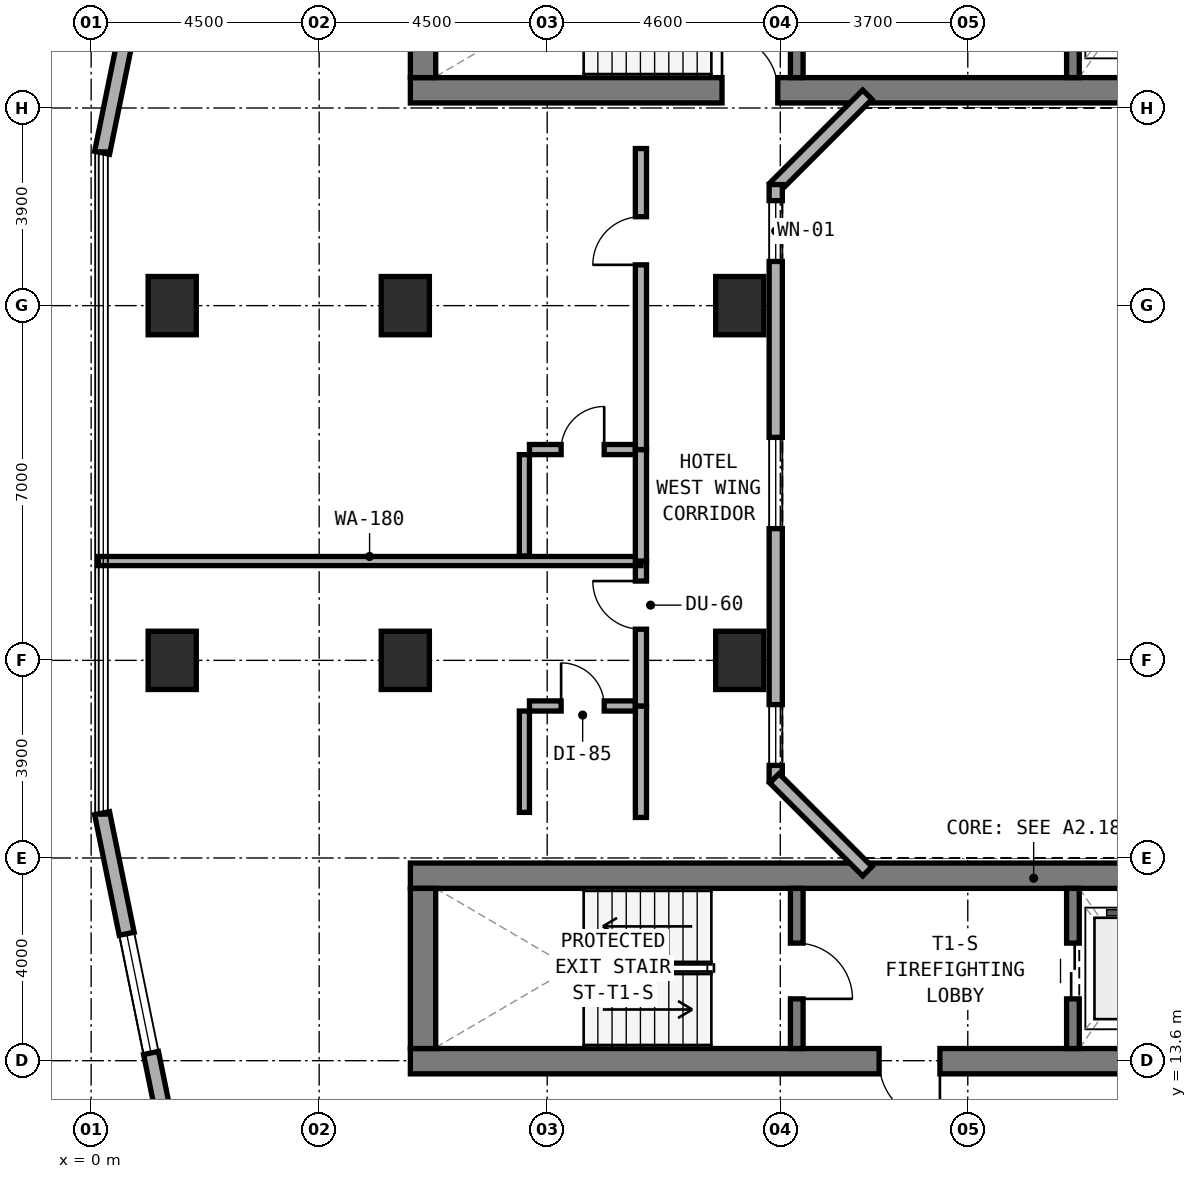
"""IFC4 building model, lengths in metres.
Left out: names, types, materials, properties, quantities, classifications, styles, units other than length and angle.
Written with IfcOpenShell. Run it as: python <this file> out.ifc"""

import sys

from ifc_helpers import new_model, si_unit, direction, frame, frame_2d, origin, origin_2d, place, context, subcontext, project, spatial, rectangle, extrude, element, fill, save


model = new_model("IFC4")
c1 = context("Model", 3, precision=1e-05, world=origin(), true_north=direction((0.0, 1.0)))
c2 = subcontext(c1, "Body", "Model", "MODEL_VIEW")
j1 = project(units=[si_unit("LENGTHUNIT", "METRE"), si_unit("PLANEANGLEUNIT", "RADIAN")], contexts=[c1])
p1 = place(None, origin())
s1 = spatial("IfcSite", under=j1, at=p1, CompositionType="ELEMENT")
p2 = place(p1, origin())
s2 = spatial("IfcBuilding", under=s1, at=p2, CompositionType="ELEMENT")
p3 = place(p2, frame((0.0, 0.0, 73.0)))
s3 = spatial("IfcBuildingStorey", under=s2, at=p3, CompositionType="ELEMENT", Elevation=73.0)
p4 = place(p3, frame((6.3, 32.75, 0.0), z_axis=(0.0, 0.0, 1.0), x_axis=(1.0, 0.0, 0.0)))
e1 = element("IfcWall", 1, at=p4, inside=s3, PredefinedType="SHEAR", context=c2, shape_type="SweptSolid", body=[
    extrude(rectangle(XDim=24.6, YDim=0.5, at=frame_2d((12.3, 0.0))), origin(), (0.0, 0.0, 1.0), 3.5),
])
p5 = place(p4, frame((6.15, 0.0, 0.0)))
e2 = element("IfcOpeningElement", 2, at=p5, cuts=e1, PredefinedType="OPENING", context=c2, shape_type="SweptSolid", body=[
    extrude(rectangle(XDim=1.1, YDim=2.15, at=frame_2d((0.55, 1.075))), frame((0.0, 0.26, 0.0), z_axis=(0.0, -1.0, 0.0), x_axis=(1.0, 0.0, 0.0)), (0.0, 0.0, 1.0), 0.52),
])
p6 = place(p3, frame((6.55, 33.0, 0.0), z_axis=(0.0, 0.0, 1.0), x_axis=(0.0, 1.0, 0.0)))
e3 = element("IfcWall", 3, at=p6, inside=s3, PredefinedType="SHEAR", context=c2, shape_type="SweptSolid", body=[
    extrude(rectangle(XDim=3.16, YDim=0.5, at=frame_2d((1.58, 0.0))), origin(), (0.0, 0.0, 1.0), 3.5),
])
p7 = place(p3, frame((13.925, 33.0, 0.0), z_axis=(0.0, 0.0, 1.0), x_axis=(0.0, 1.0, 0.0)))
e4 = element("IfcWall", 4, at=p7, inside=s3, PredefinedType="STANDARD", context=c2, shape_type="SweptSolid", body=[
    extrude(rectangle(XDim=3.16, YDim=0.25, at=frame_2d((1.58, 0.0))), origin(), (0.0, 0.0, 1.0), 3.22),
])
p8 = place(p7, frame((0.98, 0.0, 0.0)))
e5 = element("IfcOpeningElement", 5, at=p8, cuts=e4, PredefinedType="OPENING", context=c2, shape_type="SweptSolid", body=[
    extrude(rectangle(XDim=1.1, YDim=2.15, at=frame_2d((0.55, 1.075))), frame((0.0, 0.135, 0.0), z_axis=(0.0, -1.0, 0.0), x_axis=(1.0, 0.0, 0.0)), (0.0, 0.0, 1.0), 0.27),
])
p9 = place(p3, frame((19.375, 33.0, 0.0), z_axis=(0.0, 0.0, 1.0), x_axis=(0.0, 1.0, 0.0)))
e6 = element("IfcWall", 6, at=p9, inside=s3, PredefinedType="STANDARD", context=c2, shape_type="SweptSolid", body=[
    extrude(rectangle(XDim=3.16, YDim=0.25, at=frame_2d((1.58, 0.0))), origin(), (0.0, 0.0, 1.0), 3.22),
])
p10 = place(p9, frame((0.98, 0.0, 0.0)))
e7 = element("IfcOpeningElement", 7, at=p10, cuts=e6, PredefinedType="OPENING", context=c2, shape_type="SweptSolid", body=[
    extrude(rectangle(XDim=1.1, YDim=2.15, at=frame_2d((0.55, 1.075))), frame((0.0, 0.135, 0.0), z_axis=(0.0, -1.0, 0.0), x_axis=(1.0, 0.0, 0.0)), (0.0, 0.0, 1.0), 0.27),
])
p11 = place(p3, frame((6.3, 13.59, 0.0), z_axis=(0.0, 0.0, 1.0), x_axis=(1.0, 0.0, 0.0)))
e8 = element("IfcWall", 8, at=p11, inside=s3, PredefinedType="SHEAR", context=c2, shape_type="SweptSolid", body=[
    extrude(rectangle(XDim=24.6, YDim=0.5, at=frame_2d((12.3, 0.0))), origin(), (0.0, 0.0, 1.0), 3.5),
])
p12 = place(p11, frame((9.25, 0.0, 0.0)))
e9 = element("IfcOpeningElement", 9, at=p12, cuts=e8, PredefinedType="OPENING", context=c2, shape_type="SweptSolid", body=[
    extrude(rectangle(XDim=1.2, YDim=2.15, at=frame_2d((0.6, 1.075))), frame((0.0, 0.26, 0.0), z_axis=(0.0, -1.0, 0.0), x_axis=(1.0, 0.0, 0.0)), (0.0, 0.0, 1.0), 0.52),
])
p13 = place(p11, frame((17.04, 0.0, 0.0)))
e10 = element("IfcOpeningElement", 10, at=p13, cuts=e8, PredefinedType="OPENING", context=c2, shape_type="SweptSolid", body=[
    extrude(rectangle(XDim=0.85, YDim=2.1, at=frame_2d((0.425, 1.05))), frame((0.0, 0.26, 0.0), z_axis=(0.0, -1.0, 0.0), x_axis=(1.0, 0.0, 0.0)), (0.0, 0.0, 1.0), 0.52),
])
p14 = place(p3, frame((6.3, 17.25, 0.0), z_axis=(0.0, 0.0, 1.0), x_axis=(1.0, 0.0, 0.0)))
e11 = element("IfcWall", 11, at=p14, inside=s3, PredefinedType="SHEAR", context=c2, shape_type="SweptSolid", body=[
    extrude(rectangle(XDim=24.6, YDim=0.5, at=frame_2d((12.3, 0.0))), origin(), (0.0, 0.0, 1.0), 3.5),
])
p15 = place(p3, frame((6.55, 13.84, 0.0), z_axis=(0.0, 0.0, 1.0), x_axis=(0.0, 1.0, 0.0)))
e12 = element("IfcWall", 12, at=p15, inside=s3, PredefinedType="SHEAR", context=c2, shape_type="SweptSolid", body=[
    extrude(rectangle(XDim=3.16, YDim=0.5, at=frame_2d((1.58, 0.0))), origin(), (0.0, 0.0, 1.0), 3.5),
])
p16 = place(p3, frame((13.925, 13.84, 0.0), z_axis=(0.0, 0.0, 1.0), x_axis=(0.0, 1.0, 0.0)))
e13 = element("IfcWall", 13, at=p16, inside=s3, PredefinedType="STANDARD", context=c2, shape_type="SweptSolid", body=[
    extrude(rectangle(XDim=3.16, YDim=0.25, at=frame_2d((1.58, 0.0))), origin(), (0.0, 0.0, 1.0), 3.22),
])
p17 = place(p16, frame((0.98, 0.0, 0.0)))
e14 = element("IfcOpeningElement", 14, at=p17, cuts=e13, PredefinedType="OPENING", context=c2, shape_type="SweptSolid", body=[
    extrude(rectangle(XDim=1.1, YDim=2.15, at=frame_2d((0.55, 1.075))), frame((0.0, 0.135, 0.0), z_axis=(0.0, -1.0, 0.0), x_axis=(1.0, 0.0, 0.0)), (0.0, 0.0, 1.0), 0.27),
])
p18 = place(p3, frame((19.375, 13.84, 0.0), z_axis=(0.0, 0.0, 1.0), x_axis=(0.0, 1.0, 0.0)))
e15 = element("IfcWall", 15, at=p18, inside=s3, PredefinedType="STANDARD", context=c2, shape_type="SweptSolid", body=[
    extrude(rectangle(XDim=3.16, YDim=0.25, at=frame_2d((1.58, 0.0))), origin(), (0.0, 0.0, 1.0), 3.22),
])
p19 = place(p18, frame((0.98, 0.0, 0.0)))
e16 = element("IfcOpeningElement", 16, at=p19, cuts=e15, PredefinedType="OPENING", context=c2, shape_type="SweptSolid", body=[
    extrude(rectangle(XDim=1.1, YDim=2.15, at=frame_2d((0.55, 1.075))), frame((0.0, 0.135, 0.0), z_axis=(0.0, -1.0, 0.0), x_axis=(1.0, 0.0, 0.0)), (0.0, 0.0, 1.0), 0.27),
])
for number, where, z_axis, x_axis in (
    (17, (6.2, 21.5, 0.0), (0.0, 0.0, 1.0), (1.0, 0.0, 0.0)),
    (18, (6.2, 28.5, 0.0), (0.0, 0.0, 1.0), (1.0, 0.0, 0.0)),
    (19, (12.8, 21.5, 0.0), (0.0, 0.0, 1.0), (1.0, 0.0, 0.0)),
    (20, (12.8, 28.5, 0.0), (0.0, 0.0, 1.0), (1.0, 0.0, 0.0)),
    (21, (1.6, 21.5, 0.0), (0.0, 0.0, 1.0), (1.0, 0.0, 0.0)),
    (22, (1.6, 28.5, 0.0), (0.0, 0.0, 1.0), (1.0, 0.0, 0.0)),
):
    element("IfcColumn", number, at=place(p3, frame(where, z_axis=z_axis, x_axis=x_axis)), inside=s3, PredefinedType="COLUMN", context=c2, shape_type="SweptSolid", body=[
        extrude(rectangle(XDim=0.95, YDim=1.15, at=origin_2d()), origin(), (0.0, 0.0, 1.0), 3.5),
    ])
p20 = place(p3, frame((2.229, 41.378, 0.0), z_axis=(0.0, 0.0, 1.0), x_axis=(-0.199990901713, -0.979797754249, 0.0)))
e23 = element("IfcWall", 23, at=p20, inside=s3, PredefinedType="STANDARD", context=c2, shape_type="SweptSolid", body=[
    extrude(rectangle(XDim=10.065, YDim=0.3, at=frame_2d((5.033, 0.0))), origin(), (0.0, 0.0, 1.0), 3.22),
])
p21 = place(p20, frame((0.378, 0.0, 0.85)))
e24 = element("IfcOpeningElement", 24, at=p21, cuts=e23, PredefinedType="OPENING", context=c2, shape_type="SweptSolid", body=[
    extrude(rectangle(XDim=1.8, YDim=1.5, at=frame_2d((0.9, 0.75))), frame((0.0, 0.16, 0.0), z_axis=(0.0, -1.0, 0.0), x_axis=(1.0, 0.0, 0.0)), (0.0, 0.0, 1.0), 0.32),
])
p22 = place(p20, frame((5.236, 0.0, 0.8)))
e25 = element("IfcOpeningElement", 25, at=p22, cuts=e23, PredefinedType="OPENING", context=c2, shape_type="SweptSolid", body=[
    extrude(rectangle(XDim=2.4, YDim=1.6, at=frame_2d((1.2, 0.8))), frame((0.0, 0.16, 0.0), z_axis=(0.0, -1.0, 0.0), x_axis=(1.0, 0.0, 0.0)), (0.0, 0.0, 1.0), 0.32),
])
p23 = place(p3, frame((0.216, 18.484, 0.0), z_axis=(0.0, 0.0, 1.0), x_axis=(0.199990901713, -0.979797754249, 0.0)))
e26 = element("IfcWall", 26, at=p23, inside=s3, PredefinedType="STANDARD", context=c2, shape_type="SweptSolid", body=[
    extrude(rectangle(XDim=10.065, YDim=0.3, at=frame_2d((5.033, 0.0))), origin(), (0.0, 0.0, 1.0), 3.22),
])
p24 = place(p23, frame((2.429, 0.0, 0.8)))
e27 = element("IfcOpeningElement", 27, at=p24, cuts=e26, PredefinedType="OPENING", context=c2, shape_type="SweptSolid", body=[
    extrude(rectangle(XDim=2.4, YDim=1.6, at=frame_2d((1.2, 0.8))), frame((0.0, 0.16, 0.0), z_axis=(0.0, -1.0, 0.0), x_axis=(1.0, 0.0, 0.0)), (0.0, 0.0, 1.0), 0.32),
])
p25 = place(p23, frame((7.887, 0.0, 0.85)))
e28 = element("IfcOpeningElement", 28, at=p25, cuts=e26, PredefinedType="OPENING", context=c2, shape_type="SweptSolid", body=[
    extrude(rectangle(XDim=1.8, YDim=1.5, at=frame_2d((0.9, 0.75))), frame((0.0, 0.16, 0.0), z_axis=(0.0, -1.0, 0.0), x_axis=(1.0, 0.0, 0.0)), (0.0, 0.0, 1.0), 0.32),
])
p26 = place(p3, frame((15.318, 32.662, 0.0), z_axis=(0.0, 0.0, 1.0), x_axis=(-0.707106781187, -0.707106781187, 0.0)))
e29 = element("IfcWall", 29, at=p26, inside=s3, PredefinedType="STANDARD", context=c2, shape_type="SweptSolid", body=[
    extrude(rectangle(XDim=2.594, YDim=0.26, at=frame_2d((1.297, 0.0))), origin(), (0.0, 0.0, 1.0), 3.22),
])
p27 = place(p3, frame((13.51, 30.89, 0.0), z_axis=(0.0, 0.0, 1.0), x_axis=(0.0, -1.0, 0.0)))
e30 = element("IfcWall", 30, at=p27, inside=s3, PredefinedType="STANDARD", context=c2, shape_type="SweptSolid", body=[
    extrude(rectangle(XDim=11.78, YDim=0.26, at=frame_2d((5.89, 0.0))), origin(), (0.0, 0.0, 1.0), 3.22),
])
p28 = place(p27, frame((0.318, 0.0, 0.85)))
e31 = element("IfcOpeningElement", 31, at=p28, cuts=e30, PredefinedType="OPENING", context=c2, shape_type="SweptSolid", body=[
    extrude(rectangle(XDim=1.2, YDim=1.5, at=frame_2d((0.6, 0.75))), frame((0.0, 0.14, 0.0), z_axis=(0.0, -1.0, 0.0), x_axis=(1.0, 0.0, 0.0)), (0.0, 0.0, 1.0), 0.28),
])
p29 = place(p27, frame((4.99, 0.0, 0.85)))
e32 = element("IfcOpeningElement", 32, at=p29, cuts=e30, PredefinedType="OPENING", context=c2, shape_type="SweptSolid", body=[
    extrude(rectangle(XDim=1.8, YDim=1.5, at=frame_2d((0.9, 0.75))), frame((0.0, 0.14, 0.0), z_axis=(0.0, -1.0, 0.0), x_axis=(1.0, 0.0, 0.0)), (0.0, 0.0, 1.0), 0.28),
])
p30 = place(p27, frame((10.263, 0.0, 0.85)))
e33 = element("IfcOpeningElement", 33, at=p30, cuts=e30, PredefinedType="OPENING", context=c2, shape_type="SweptSolid", body=[
    extrude(rectangle(XDim=1.2, YDim=1.5, at=frame_2d((0.6, 0.75))), frame((0.0, 0.14, 0.0), z_axis=(0.0, -1.0, 0.0), x_axis=(1.0, 0.0, 0.0)), (0.0, 0.0, 1.0), 0.28),
])
p31 = place(p3, frame((13.484, 19.172, 0.0), z_axis=(0.0, 0.0, 1.0), x_axis=(0.707106781187, -0.707106781187, 0.0)))
e34 = element("IfcWall", 34, at=p31, inside=s3, PredefinedType="STANDARD", context=c2, shape_type="SweptSolid", body=[
    extrude(rectangle(XDim=2.594, YDim=0.26, at=frame_2d((1.297, 0.0))), origin(), (0.0, 0.0, 1.0), 3.22),
])
p32 = place(p3, frame((8.65, 20.6, 0.0), z_axis=(0.0, 0.0, 1.0), x_axis=(1.0, 0.0, 0.0)))
e35 = element("IfcWall", 35, at=p32, inside=s3, PredefinedType="PLUMBINGWALL", context=c2, shape_type="SweptSolid", body=[
    extrude(rectangle(XDim=2.1, YDim=0.2, at=frame_2d((1.05, 0.0))), origin(), (0.0, 0.0, 1.0), 3.22),
])
p33 = place(p32, frame((0.625, 0.0, 0.0)))
e36 = element("IfcOpeningElement", 36, at=p33, cuts=e35, PredefinedType="OPENING", context=c2, shape_type="SweptSolid", body=[
    extrude(rectangle(XDim=0.85, YDim=2.1, at=frame_2d((0.425, 1.05))), frame((0.0, 0.11, 0.0), z_axis=(0.0, -1.0, 0.0), x_axis=(1.0, 0.0, 0.0)), (0.0, 0.0, 1.0), 0.22),
])
p34 = place(p3, frame((8.55, 18.5, 0.0), z_axis=(0.0, 0.0, 1.0), x_axis=(0.0, 1.0, 0.0)))
e37 = element("IfcWall", 37, at=p34, inside=s3, PredefinedType="PLUMBINGWALL", context=c2, shape_type="SweptSolid", body=[
    extrude(rectangle(XDim=2.0, YDim=0.2, at=frame_2d((1.0, 0.0))), origin(), (0.0, 0.0, 1.0), 3.22),
])
p35 = place(p3, frame((10.85, 18.4, 0.0), z_axis=(0.0, 0.0, 1.0), x_axis=(0.0, 1.0, 0.0)))
e38 = element("IfcWall", 38, at=p35, inside=s3, PredefinedType="SOLIDWALL", context=c2, shape_type="SweptSolid", body=[
    extrude(rectangle(XDim=2.2, YDim=0.22, at=frame_2d((1.1, 0.0))), origin(), (0.0, 0.0, 1.0), 3.22),
])
p36 = place(p3, frame((10.85, 20.6, 0.0), z_axis=(0.0, 0.0, 1.0), x_axis=(0.0, 1.0, 0.0)))
e39 = element("IfcWall", 39, at=p36, inside=s3, PredefinedType="SOLIDWALL", context=c2, shape_type="SweptSolid", body=[
    extrude(rectangle(XDim=2.86, YDim=0.22, at=frame_2d((1.43, 0.0))), origin(), (0.0, 0.0, 1.0), 2.495),
])
p37 = place(p36, frame((1.515, 0.0, 0.0)))
e40 = element("IfcOpeningElement", 40, at=p37, cuts=e39, PredefinedType="OPENING", context=c2, shape_type="SweptSolid", body=[
    extrude(rectangle(XDim=0.95, YDim=2.1, at=frame_2d((0.475, 1.05))), frame((0.0, 0.12, 0.0), z_axis=(0.0, -1.0, 0.0), x_axis=(1.0, 0.0, 0.0)), (0.0, 0.0, 1.0), 0.24),
])
p38 = place(p3, frame((0.14, 23.46, 0.0), z_axis=(0.0, 0.0, 1.0), x_axis=(1.0, 0.0, 0.0)))
e41 = element("IfcWall", 41, at=p38, inside=s3, PredefinedType="SOLIDWALL", context=c2, shape_type="SweptSolid", body=[
    extrude(rectangle(XDim=10.71, YDim=0.18, at=frame_2d((5.355, 0.0))), origin(), (0.0, 0.0, 1.0), 2.745),
])
p39 = place(p3, frame((8.65, 25.66, 0.0), z_axis=(0.0, 0.0, 1.0), x_axis=(1.0, 0.0, 0.0)))
e42 = element("IfcWall", 42, at=p39, inside=s3, PredefinedType="PLUMBINGWALL", context=c2, shape_type="SweptSolid", body=[
    extrude(rectangle(XDim=2.1, YDim=0.2, at=frame_2d((1.05, 0.0))), origin(), (0.0, 0.0, 1.0), 3.22),
])
p40 = place(p39, frame((0.625, 0.0, 0.0)))
e43 = element("IfcOpeningElement", 43, at=p40, cuts=e42, PredefinedType="OPENING", context=c2, shape_type="SweptSolid", body=[
    extrude(rectangle(XDim=0.85, YDim=2.1, at=frame_2d((0.425, 1.05))), frame((0.0, 0.11, 0.0), z_axis=(0.0, -1.0, 0.0), x_axis=(1.0, 0.0, 0.0)), (0.0, 0.0, 1.0), 0.22),
])
p41 = place(p3, frame((8.55, 23.56, 0.0), z_axis=(0.0, 0.0, 1.0), x_axis=(0.0, 1.0, 0.0)))
e44 = element("IfcWall", 44, at=p41, inside=s3, PredefinedType="PLUMBINGWALL", context=c2, shape_type="SweptSolid", body=[
    extrude(rectangle(XDim=2.0, YDim=0.2, at=frame_2d((1.0, 0.0))), origin(), (0.0, 0.0, 1.0), 3.22),
])
p42 = place(p3, frame((10.85, 23.46, 0.0), z_axis=(0.0, 0.0, 1.0), x_axis=(0.0, 1.0, 0.0)))
e45 = element("IfcWall", 45, at=p42, inside=s3, PredefinedType="SOLIDWALL", context=c2, shape_type="SweptSolid", body=[
    extrude(rectangle(XDim=2.2, YDim=0.22, at=frame_2d((1.1, 0.0))), origin(), (0.0, 0.0, 1.0), 3.22),
])
p43 = place(p3, frame((10.85, 25.66, 0.0), z_axis=(0.0, 0.0, 1.0), x_axis=(0.0, 1.0, 0.0)))
e46 = element("IfcWall", 46, at=p43, inside=s3, PredefinedType="SOLIDWALL", context=c2, shape_type="SweptSolid", body=[
    extrude(rectangle(XDim=5.94, YDim=0.22, at=frame_2d((2.97, 0.0))), origin(), (0.0, 0.0, 1.0), 2.495),
])
p44 = place(p43, frame((3.645, 0.0, 0.0)))
e47 = element("IfcOpeningElement", 47, at=p44, cuts=e46, PredefinedType="OPENING", context=c2, shape_type="SweptSolid", body=[
    extrude(rectangle(XDim=0.95, YDim=2.1, at=frame_2d((0.475, 1.05))), frame((0.0, 0.12, 0.0), z_axis=(0.0, -1.0, 0.0), x_axis=(1.0, 0.0, 0.0)), (0.0, 0.0, 1.0), 0.24),
])
p45 = place(p24, origin())
e48 = element("IfcWindow", 48, at=p45, inside=s3, PartitioningType="SINGLE_PANEL", PredefinedType="WINDOW", context=c2, shape_type="SweptSolid", body=[
    extrude(rectangle(XDim=2.4, YDim=1.6, at=frame_2d((1.2, 0.8))), frame((0.0, 0.03, 0.0), z_axis=(0.0, -1.0, 0.0), x_axis=(1.0, 0.0, 0.0)), (0.0, 0.0, 1.0), 0.06),
])
fill(e27, e48)
p46 = place(p28, origin())
e49 = element("IfcWindow", 49, at=p46, inside=s3, PartitioningType="SINGLE_PANEL", PredefinedType="WINDOW", context=c2, shape_type="SweptSolid", body=[
    extrude(rectangle(XDim=1.2, YDim=1.5, at=frame_2d((0.6, 0.75))), frame((0.0, 0.03, 0.0), z_axis=(0.0, -1.0, 0.0), x_axis=(1.0, 0.0, 0.0)), (0.0, 0.0, 1.0), 0.06),
])
fill(e31, e49)
p47 = place(p29, origin())
e50 = element("IfcWindow", 50, at=p47, inside=s3, PartitioningType="SINGLE_PANEL", PredefinedType="WINDOW", context=c2, shape_type="SweptSolid", body=[
    extrude(rectangle(XDim=1.8, YDim=1.5, at=frame_2d((0.9, 0.75))), frame((0.0, 0.03, 0.0), z_axis=(0.0, -1.0, 0.0), x_axis=(1.0, 0.0, 0.0)), (0.0, 0.0, 1.0), 0.06),
])
fill(e32, e50)
p48 = place(p30, origin())
e51 = element("IfcWindow", 51, at=p48, inside=s3, PartitioningType="SINGLE_PANEL", PredefinedType="WINDOW", context=c2, shape_type="SweptSolid", body=[
    extrude(rectangle(XDim=1.2, YDim=1.5, at=frame_2d((0.6, 0.75))), frame((0.0, 0.03, 0.0), z_axis=(0.0, -1.0, 0.0), x_axis=(1.0, 0.0, 0.0)), (0.0, 0.0, 1.0), 0.06),
])
fill(e33, e51)
p49 = place(p17, frame((1.1, 0.0, 0.0), z_axis=(0.0, 0.0, 1.0), x_axis=(-1.0, 0.0, 0.0)))
e52 = element("IfcDoor", 52, at=p49, inside=s3, OperationType="SINGLE_SWING_RIGHT", PredefinedType="DOOR", context=c2, shape_type="SweptSolid", body=[
    extrude(rectangle(XDim=1.1, YDim=2.15, at=frame_2d((0.55, 1.075))), frame((0.0, 0.025, 0.0), z_axis=(0.0, -1.0, 0.0), x_axis=(1.0, 0.0, 0.0)), (0.0, 0.0, 1.0), 0.05),
])
fill(e14, e52)
p50 = place(p12, frame((1.2, 0.0, 0.0), z_axis=(0.0, 0.0, 1.0), x_axis=(-1.0, 0.0, 0.0)))
e53 = element("IfcDoor", 53, at=p50, inside=s3, OperationType="SINGLE_SWING_LEFT", PredefinedType="DOOR", context=c2, shape_type="SweptSolid", body=[
    extrude(rectangle(XDim=1.2, YDim=2.15, at=frame_2d((0.6, 1.075))), frame((0.0, 0.025, 0.0), z_axis=(0.0, -1.0, 0.0), x_axis=(1.0, 0.0, 0.0)), (0.0, 0.0, 1.0), 0.05),
])
fill(e9, e53)
p51 = place(p19, origin())
e54 = element("IfcDoor", 54, at=p51, inside=s3, OperationType="DOUBLE_DOOR_SLIDING", PredefinedType="DOOR", context=c2, shape_type="SweptSolid", body=[
    extrude(rectangle(XDim=1.1, YDim=2.15, at=frame_2d((0.55, 1.075))), frame((0.0, 0.025, 0.0), z_axis=(0.0, -1.0, 0.0), x_axis=(1.0, 0.0, 0.0)), (0.0, 0.0, 1.0), 0.05),
])
fill(e16, e54)
p52 = place(p5, origin())
e55 = element("IfcDoor", 55, at=p52, inside=s3, OperationType="SINGLE_SWING_LEFT", PredefinedType="DOOR", context=c2, shape_type="SweptSolid", body=[
    extrude(rectangle(XDim=1.1, YDim=2.15, at=frame_2d((0.55, 1.075))), frame((0.0, 0.025, 0.0), z_axis=(0.0, -1.0, 0.0), x_axis=(1.0, 0.0, 0.0)), (0.0, 0.0, 1.0), 0.05),
])
fill(e2, e55)
p53 = place(p33, origin())
e56 = element("IfcDoor", 56, at=p53, inside=s3, OperationType="SINGLE_SWING_LEFT", PredefinedType="DOOR", context=c2, shape_type="SweptSolid", body=[
    extrude(rectangle(XDim=0.85, YDim=2.1, at=frame_2d((0.425, 1.05))), frame((0.0, 0.025, 0.0), z_axis=(0.0, -1.0, 0.0), x_axis=(1.0, 0.0, 0.0)), (0.0, 0.0, 1.0), 0.05),
])
fill(e36, e56)
p54 = place(p37, origin())
e57 = element("IfcDoor", 57, at=p54, inside=s3, OperationType="SINGLE_SWING_RIGHT", PredefinedType="DOOR", context=c2, shape_type="SweptSolid", body=[
    extrude(rectangle(XDim=0.95, YDim=2.1, at=frame_2d((0.475, 1.05))), frame((0.0, 0.025, 0.0), z_axis=(0.0, -1.0, 0.0), x_axis=(1.0, 0.0, 0.0)), (0.0, 0.0, 1.0), 0.05),
])
fill(e40, e57)
p55 = place(p40, origin())
e58 = element("IfcDoor", 58, at=p55, inside=s3, OperationType="SINGLE_SWING_RIGHT", PredefinedType="DOOR", context=c2, shape_type="SweptSolid", body=[
    extrude(rectangle(XDim=0.85, YDim=2.1, at=frame_2d((0.425, 1.05))), frame((0.0, 0.025, 0.0), z_axis=(0.0, -1.0, 0.0), x_axis=(1.0, 0.0, 0.0)), (0.0, 0.0, 1.0), 0.05),
])
fill(e43, e58)
p56 = place(p44, origin())
e59 = element("IfcDoor", 59, at=p56, inside=s3, OperationType="SINGLE_SWING_LEFT", PredefinedType="DOOR", context=c2, shape_type="SweptSolid", body=[
    extrude(rectangle(XDim=0.95, YDim=2.1, at=frame_2d((0.475, 1.05))), frame((0.0, 0.025, 0.0), z_axis=(0.0, -1.0, 0.0), x_axis=(1.0, 0.0, 0.0)), (0.0, 0.0, 1.0), 0.05),
])
fill(e47, e59)
save(model, sys.argv[1])
